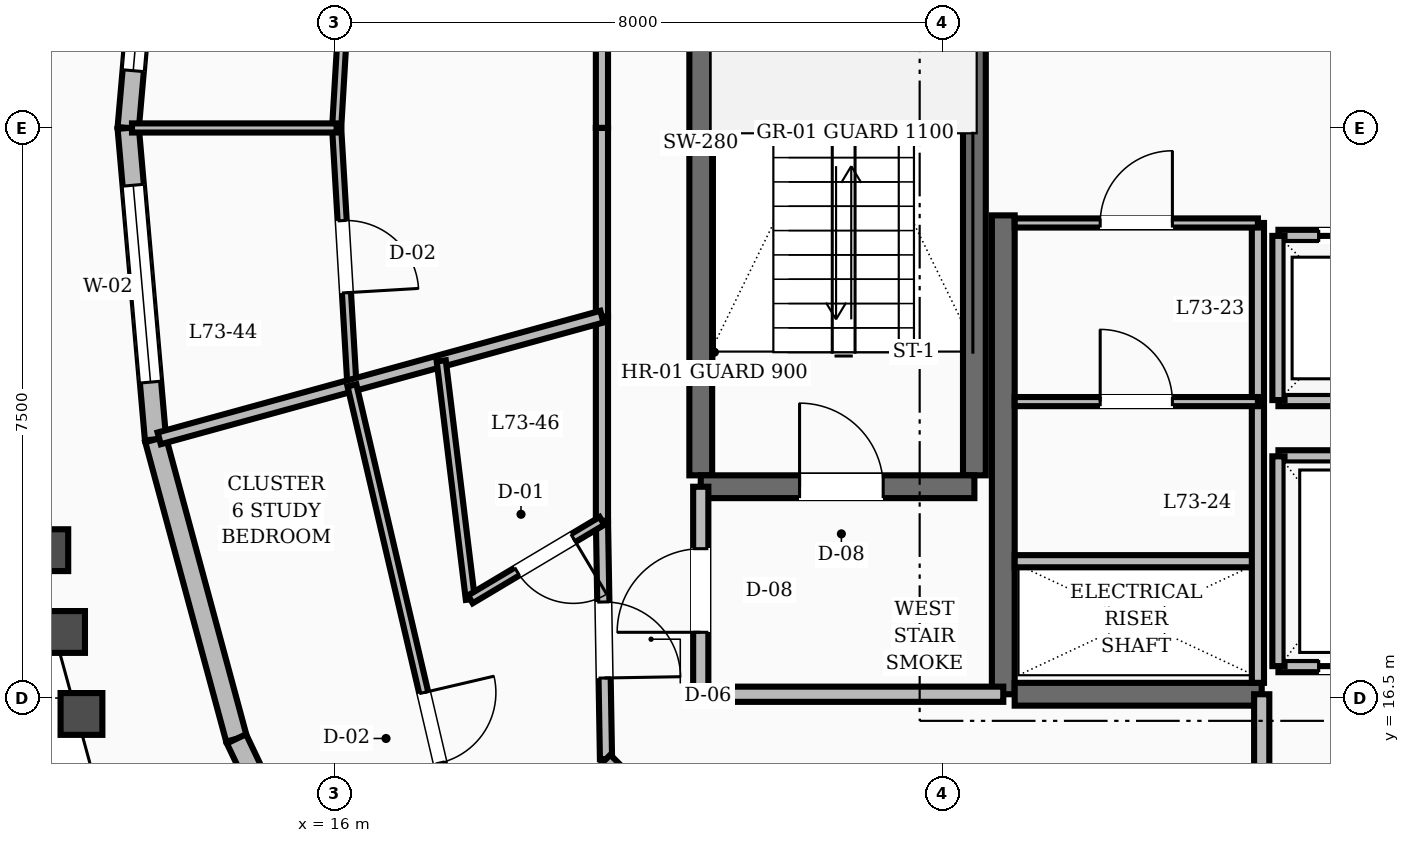
"""IFC4 building model, lengths in metres.
Left out: names, types, materials, properties, quantities, classifications, styles, units other than length and angle.
Written with IfcOpenShell. Run it as: python <this file> out.ifc"""

import sys

from ifc_helpers import new_model, si_unit, direction, frame, frame_2d, origin, place, context, subcontext, project, spatial, rectangle, extrude, element, fill, save


model = new_model("IFC4")
c1 = context("Model", 3, precision=1e-05, world=origin(), true_north=direction((0.0, 1.0)))
c2 = subcontext(c1, "Body", "Model", "MODEL_VIEW")
j1 = project(units=[si_unit("LENGTHUNIT", "METRE"), si_unit("PLANEANGLEUNIT", "RADIAN")], contexts=[c1])
p1 = place(None, origin())
s1 = spatial("IfcSite", under=j1, at=p1, CompositionType="ELEMENT")
p2 = place(p1, origin())
s2 = spatial("IfcBuilding", under=s1, at=p2, CompositionType="ELEMENT")
p3 = place(p2, frame((0.0, 0.0, 279.6)))
s3 = spatial("IfcBuildingStorey", under=s2, at=p3, CompositionType="ELEMENT", Elevation=279.6)
p4 = place(p3, frame((24.8, 16.55, 0.0), z_axis=(0.0, 0.0, 1.0), x_axis=(0.0, 1.0, 0.0)))
e1 = element("IfcWall", 1, at=p4, inside=s3, PredefinedType="SHEAR", context=c2, shape_type="SweptSolid", body=[
    extrude(rectangle(XDim=6.3, YDim=0.3, at=frame_2d((3.15, 0.0))), origin(), (0.0, 0.0, 1.0), 3.6),
])
p5 = place(p3, frame((24.95, 16.55, 0.0), z_axis=(0.0, 0.0, 1.0), x_axis=(1.0, 0.0, 0.0)))
e2 = element("IfcWall", 2, at=p5, inside=s3, PredefinedType="SHEAR", context=c2, shape_type="SweptSolid", body=[
    extrude(rectangle(XDim=3.25, YDim=0.3, at=frame_2d((1.625, 0.0))), origin(), (0.0, 0.0, 1.0), 3.6),
])
for number, where, z_axis, x_axis in (
    (3, (20.82, 19.43, 0.0), (0.0, 0.0, 1.0), (0.0, 1.0, 0.0)),
    (4, (24.42, 19.43, 0.0), (0.0, 0.0, 1.0), (0.0, 1.0, 0.0)),
):
    element("IfcWall", number, at=place(p3, frame(where, z_axis=z_axis, x_axis=x_axis)), inside=s3, PredefinedType="SHEAR", context=c2, shape_type="SweptSolid", body=[
        extrude(rectangle(XDim=8.74, YDim=0.3, at=frame_2d((4.37, 0.0))), origin(), (0.0, 0.0, 1.0), 3.6),
    ])
p6 = place(p3, frame((20.82, 19.28, 0.0), z_axis=(0.0, 0.0, 1.0), x_axis=(1.0, 0.0, 0.0)))
e5 = element("IfcWall", 5, at=p6, inside=s3, PredefinedType="SHEAR", context=c2, shape_type="SweptSolid", body=[
    extrude(rectangle(XDim=3.6, YDim=0.3, at=frame_2d((1.8, 0.0))), origin(), (0.0, 0.0, 1.0), 3.6),
])
p7 = place(p6, frame((1.3, 0.0, 0.0)))
e6 = element("IfcOpeningElement", 6, at=p7, cuts=e5, PredefinedType="OPENING", context=c2, shape_type="SweptSolid", body=[
    extrude(rectangle(XDim=1.1, YDim=2.1, at=frame_2d((0.55, 1.05))), frame((0.0, 0.16, 0.0), z_axis=(0.0, -1.0, 0.0), x_axis=(1.0, 0.0, 0.0)), (0.0, 0.0, 1.0), 0.32),
])
p8 = place(p3, frame((13.647, 28.097, 0.0), z_axis=(0.0, 0.0, 1.0), x_axis=(-0.087441623723, -0.996169645412, 0.0)))
e7 = element("IfcWall", 7, at=p8, inside=s3, PredefinedType="STANDARD", context=c2, shape_type="SweptSolid", body=[
    extrude(rectangle(XDim=4.113, YDim=0.28, at=frame_2d((2.056, 0.0))), origin(), (0.0, 0.0, 1.0), 2.88),
])
p9 = place(p8, frame((0.756, 0.0, 0.8)))
e8 = element("IfcOpeningElement", 8, at=p9, cuts=e7, PredefinedType="OPENING", context=c2, shape_type="SweptSolid", body=[
    extrude(rectangle(XDim=2.6, YDim=1.65, at=frame_2d((1.3, 0.825))), frame((0.0, 0.15, 0.0), z_axis=(0.0, -1.0, 0.0), x_axis=(1.0, 0.0, 0.0)), (0.0, 0.0, 1.0), 0.3),
])
p10 = place(p3, frame((13.287, 24.0, 0.0), z_axis=(0.0, 0.0, 1.0), x_axis=(0.087441623723, -0.996169645412, 0.0)))
e9 = element("IfcWall", 9, at=p10, inside=s3, PredefinedType="STANDARD", context=c2, shape_type="SweptSolid", body=[
    extrude(rectangle(XDim=4.113, YDim=0.28, at=frame_2d((2.056, 0.0))), origin(), (0.0, 0.0, 1.0), 2.88),
])
p11 = place(p10, frame((0.756, 0.0, 0.8)))
e10 = element("IfcOpeningElement", 10, at=p11, cuts=e9, PredefinedType="OPENING", context=c2, shape_type="SweptSolid", body=[
    extrude(rectangle(XDim=2.6, YDim=1.65, at=frame_2d((1.3, 0.825))), frame((0.0, 0.15, 0.0), z_axis=(0.0, -1.0, 0.0), x_axis=(1.0, 0.0, 0.0)), (0.0, 0.0, 1.0), 0.3),
])
p12 = place(p3, frame((13.647, 19.903, 0.0), z_axis=(0.0, 0.0, 1.0), x_axis=(0.260889436927, -0.965368686927, 0.0)))
e11 = element("IfcWall", 11, at=p12, inside=s3, PredefinedType="STANDARD", context=c2, shape_type="SweptSolid", body=[
    extrude(rectangle(XDim=4.081, YDim=0.28, at=frame_2d((2.041, 0.0))), origin(), (0.0, 0.0, 1.0), 2.88),
])
p13 = place(p3, frame((14.712, 15.963, 0.0), z_axis=(0.0, 0.0, 1.0), x_axis=(0.430011346388, -0.902823483289, 0.0)))
e12 = element("IfcWall", 12, at=p13, inside=s3, PredefinedType="STANDARD", context=c2, shape_type="SweptSolid", body=[
    extrude(rectangle(XDim=4.021, YDim=0.28, at=frame_2d((2.011, 0.0))), origin(), (0.0, 0.0, 1.0), 2.88),
])
p14 = place(p13, frame((0.711, 0.0, 0.8)))
e13 = element("IfcOpeningElement", 13, at=p14, cuts=e12, PredefinedType="OPENING", context=c2, shape_type="SweptSolid", body=[
    extrude(rectangle(XDim=2.6, YDim=1.65, at=frame_2d((1.3, 0.825))), frame((0.0, 0.15, 0.0), z_axis=(0.0, -1.0, 0.0), x_axis=(1.0, 0.0, 0.0)), (0.0, 0.0, 1.0), 0.3),
])
p15 = place(p3, frame((20.82, 16.55, 0.0), z_axis=(0.0, 0.0, 1.0), x_axis=(0.0, 1.0, 0.0)))
e14 = element("IfcWall", 14, at=p15, inside=s3, PredefinedType="SOLIDWALL", context=c2, shape_type="SweptSolid", body=[
    extrude(rectangle(XDim=2.73, YDim=0.2, at=frame_2d((1.365, 0.0))), origin(), (0.0, 0.0, 1.0), 2.87),
])
p16 = place(p15, frame((0.815, 0.0, 0.0)))
e15 = element("IfcOpeningElement", 15, at=p16, cuts=e14, PredefinedType="OPENING", context=c2, shape_type="SweptSolid", body=[
    extrude(rectangle(XDim=1.1, YDim=2.1, at=frame_2d((0.55, 1.05))), frame((0.0, 0.11, 0.0), z_axis=(0.0, -1.0, 0.0), x_axis=(1.0, 0.0, 0.0)), (0.0, 0.0, 1.0), 0.22),
])
p17 = place(p3, frame((20.82, 16.55, 0.0), z_axis=(0.0, 0.0, 1.0), x_axis=(1.0, 0.0, 0.0)))
e16 = element("IfcWall", 16, at=p17, inside=s3, PredefinedType="SOLIDWALL", context=c2, shape_type="SweptSolid", body=[
    extrude(rectangle(XDim=3.98, YDim=0.2, at=frame_2d((1.99, 0.0))), origin(), (0.0, 0.0, 1.0), 2.87),
])
p18 = place(p3, frame((28.2, 14.35, 0.0), z_axis=(0.0, 0.0, 1.0), x_axis=(0.0, 1.0, 0.0)))
e17 = element("IfcWall", 17, at=p18, inside=s3, PredefinedType="SOLIDWALL", context=c2, shape_type="SweptSolid", body=[
    extrude(rectangle(XDim=2.2, YDim=0.2, at=frame_2d((1.1, 0.0))), origin(), (0.0, 0.0, 1.0), 2.87),
])
p19 = place(p3, frame((28.42, 22.58, 0.0), z_axis=(0.0, 0.0, 1.0), x_axis=(1.0, 0.0, 0.0)))
e18 = element("IfcWall", 18, at=p19, inside=s3, PredefinedType="SOLIDWALL", context=c2, shape_type="SweptSolid", body=[
    extrude(rectangle(XDim=2.16, YDim=0.16, at=frame_2d((1.08, 0.0))), origin(), (0.0, 0.0, 1.0), 2.87),
])
p20 = place(p19, frame((0.53, 0.0, 0.0)))
e19 = element("IfcOpeningElement", 19, at=p20, cuts=e18, PredefinedType="OPENING", context=c2, shape_type="SweptSolid", body=[
    extrude(rectangle(XDim=1.1, YDim=2.15, at=frame_2d((0.55, 1.075))), frame((0.0, 0.09, 0.0), z_axis=(0.0, -1.0, 0.0), x_axis=(1.0, 0.0, 0.0)), (0.0, 0.0, 1.0), 0.18),
])
for number, where, z_axis, x_axis in (
    (20, (28.42, 20.42, 0.0), (0.0, 0.0, 1.0), (1.0, 0.0, 0.0)),
    (21, (28.42, 20.42, 0.0), (0.0, 0.0, 1.0), (0.0, 1.0, 0.0)),
):
    element("IfcWall", number, at=place(p3, frame(where, z_axis=z_axis, x_axis=x_axis)), inside=s3, PredefinedType="SOLIDWALL", context=c2, shape_type="SweptSolid", body=[
        extrude(rectangle(XDim=2.16, YDim=0.16, at=frame_2d((1.08, 0.0))), origin(), (0.0, 0.0, 1.0), 2.87),
    ])
p21 = place(p3, frame((28.42, 16.92, 0.0), z_axis=(0.0, 0.0, 1.0), x_axis=(1.0, 0.0, 0.0)))
e22 = element("IfcWall", 22, at=p21, inside=s3, PredefinedType="SOLIDWALL", context=c2, shape_type="SweptSolid", body=[
    extrude(rectangle(XDim=7.16, YDim=0.16, at=frame_2d((3.58, 0.0))), origin(), (0.0, 0.0, 1.0), 2.87),
])
p22 = place(p21, frame((0.53, 0.0, 0.0)))
e23 = element("IfcOpeningElement", 23, at=p22, cuts=e22, PredefinedType="OPENING", context=c2, shape_type="SweptSolid", body=[
    extrude(rectangle(XDim=1.1, YDim=2.15, at=frame_2d((0.55, 1.075))), frame((0.0, 0.09, 0.0), z_axis=(0.0, -1.0, 0.0), x_axis=(1.0, 0.0, 0.0)), (0.0, 0.0, 1.0), 0.18),
])
p23 = place(p21, frame((3.03, 0.0, 0.0)))
e24 = element("IfcOpeningElement", 24, at=p23, cuts=e22, PredefinedType="OPENING", context=c2, shape_type="SweptSolid", body=[
    extrude(rectangle(XDim=1.1, YDim=2.15, at=frame_2d((0.55, 1.075))), frame((0.0, 0.09, 0.0), z_axis=(0.0, -1.0, 0.0), x_axis=(1.0, 0.0, 0.0)), (0.0, 0.0, 1.0), 0.18),
])
p24 = place(p21, frame((5.53, 0.0, 0.0)))
e25 = element("IfcOpeningElement", 25, at=p24, cuts=e22, PredefinedType="OPENING", context=c2, shape_type="SweptSolid", body=[
    extrude(rectangle(XDim=1.1, YDim=2.15, at=frame_2d((0.55, 1.075))), frame((0.0, 0.09, 0.0), z_axis=(0.0, -1.0, 0.0), x_axis=(1.0, 0.0, 0.0)), (0.0, 0.0, 1.0), 0.18),
])
p25 = place(p3, frame((28.42, 19.68, 0.0), z_axis=(0.0, 0.0, 1.0), x_axis=(1.0, 0.0, 0.0)))
e26 = element("IfcWall", 26, at=p25, inside=s3, PredefinedType="SOLIDWALL", context=c2, shape_type="SweptSolid", body=[
    extrude(rectangle(XDim=7.16, YDim=0.16, at=frame_2d((3.58, 0.0))), origin(), (0.0, 0.0, 1.0), 2.87),
])
p26 = place(p3, frame((28.42, 16.92, 0.0), z_axis=(0.0, 0.0, 1.0), x_axis=(0.0, 1.0, 0.0)))
e27 = element("IfcWall", 27, at=p26, inside=s3, PredefinedType="SOLIDWALL", context=c2, shape_type="SweptSolid", body=[
    extrude(rectangle(XDim=2.76, YDim=0.16, at=frame_2d((1.38, 0.0))), origin(), (0.0, 0.0, 1.0), 2.87),
])
p27 = place(p3, frame((24.95, 18.3, 0.0), z_axis=(0.0, 0.0, 1.0), x_axis=(1.0, 0.0, 0.0)))
e28 = element("IfcWall", 28, at=p27, inside=s3, PredefinedType="SOLIDWALL", context=c2, shape_type="SweptSolid", body=[
    extrude(rectangle(XDim=3.2, YDim=0.16, at=frame_2d((1.6, 0.0))), origin(), (0.0, 0.0, 1.0), 2.87),
])
p28 = place(p3, frame((28.15, 16.7, 0.0), z_axis=(0.0, 0.0, 1.0), x_axis=(0.0, 1.0, 0.0)))
e29 = element("IfcWall", 29, at=p28, inside=s3, PredefinedType="SOLIDWALL", context=c2, shape_type="SweptSolid", body=[
    extrude(rectangle(XDim=6.05, YDim=0.16, at=frame_2d((3.025, 0.0))), origin(), (0.0, 0.0, 1.0), 2.87),
])
p29 = place(p3, frame((24.95, 22.75, 0.0), z_axis=(0.0, 0.0, 1.0), x_axis=(1.0, 0.0, 0.0)))
e30 = element("IfcWall", 30, at=p29, inside=s3, PredefinedType="PARTITIONING", context=c2, shape_type="SweptSolid", body=[
    extrude(rectangle(XDim=3.2, YDim=0.12, at=frame_2d((1.6, 0.0))), origin(), (0.0, 0.0, 1.0), 2.87),
])
p30 = place(p29, frame((1.125, 0.0, 0.0)))
e31 = element("IfcOpeningElement", 31, at=p30, cuts=e30, PredefinedType="OPENING", context=c2, shape_type="SweptSolid", body=[
    extrude(rectangle(XDim=0.95, YDim=2.1, at=frame_2d((0.475, 1.05))), frame((0.0, 0.07, 0.0), z_axis=(0.0, -1.0, 0.0), x_axis=(1.0, 0.0, 0.0)), (0.0, 0.0, 1.0), 0.14),
])
p31 = place(p3, frame((24.95, 20.4, 0.0), z_axis=(0.0, 0.0, 1.0), x_axis=(1.0, 0.0, 0.0)))
e32 = element("IfcWall", 32, at=p31, inside=s3, PredefinedType="PARTITIONING", context=c2, shape_type="SweptSolid", body=[
    extrude(rectangle(XDim=3.2, YDim=0.12, at=frame_2d((1.6, 0.0))), origin(), (0.0, 0.0, 1.0), 2.87),
])
p32 = place(p31, frame((1.125, 0.0, 0.0)))
e33 = element("IfcOpeningElement", 33, at=p32, cuts=e32, PredefinedType="OPENING", context=c2, shape_type="SweptSolid", body=[
    extrude(rectangle(XDim=0.95, YDim=2.1, at=frame_2d((0.475, 1.05))), frame((0.0, 0.07, 0.0), z_axis=(0.0, -1.0, 0.0), x_axis=(1.0, 0.0, 0.0)), (0.0, 0.0, 1.0), 0.14),
])
for number, where, z_axis, x_axis in (
    (34, (19.52, 26.482, 0.0), (0.0, 0.0, 1.0), (0.0, -1.0, 0.0)),
    (35, (19.52, 24.0, 0.0), (0.0, 0.0, 1.0), (0.0, -1.0, 0.0)),
):
    element("IfcWall", number, at=place(p3, frame(where, z_axis=z_axis, x_axis=x_axis)), inside=s3, PredefinedType="SOLIDWALL", context=c2, shape_type="SweptSolid", body=[
        extrude(rectangle(XDim=2.482, YDim=0.16, at=frame_2d((1.241, 0.0))), origin(), (0.0, 0.0, 1.0), 2.87),
    ])
p33 = place(p3, frame((19.52, 21.518, 0.0), z_axis=(0.0, 0.0, 1.0), x_axis=(0.0, -1.0, 0.0)))
e36 = element("IfcWall", 36, at=p33, inside=s3, PredefinedType="SOLIDWALL", context=c2, shape_type="SweptSolid", body=[
    extrude(rectangle(XDim=2.687, YDim=0.16, at=frame_2d((1.344, 0.0))), origin(), (0.0, 0.0, 1.0), 2.87),
])
p34 = place(p3, frame((19.52, 18.831, 0.0), z_axis=(0.0, 0.0, 1.0), x_axis=(0.016981035134, -0.999855811828, 0.0)))
e37 = element("IfcWall", 37, at=p34, inside=s3, PredefinedType="SOLIDWALL", context=c2, shape_type="SweptSolid", body=[
    extrude(rectangle(XDim=3.134, YDim=0.16, at=frame_2d((1.567, 0.0))), origin(), (0.0, 0.0, 1.0), 2.87),
])
p35 = place(p34, frame((1.067, 0.0, 0.0)))
e38 = element("IfcOpeningElement", 38, at=p35, cuts=e37, PredefinedType="OPENING", context=c2, shape_type="SweptSolid", body=[
    extrude(rectangle(XDim=1.0, YDim=2.1, at=frame_2d((0.5, 1.05))), frame((0.0, 0.09, 0.0), z_axis=(0.0, -1.0, 0.0), x_axis=(1.0, 0.0, 0.0)), (0.0, 0.0, 1.0), 0.18),
])
p36 = place(p3, frame((19.573, 15.697, 0.0), z_axis=(0.0, 0.0, 1.0), x_axis=(0.707106781187, -0.707106781187, 0.0)))
e39 = element("IfcWall", 39, at=p36, inside=s3, PredefinedType="SOLIDWALL", context=c2, shape_type="SweptSolid", body=[
    extrude(rectangle(XDim=2.916, YDim=0.16, at=frame_2d((1.458, 0.0))), origin(), (0.0, 0.0, 1.0), 2.87),
])
p37 = place(p3, frame((16.231, 27.387, 0.0), z_axis=(0.0, 0.0, 1.0), x_axis=(-0.059367421014, -0.998236199164, 0.0)))
e40 = element("IfcWall", 40, at=p37, inside=s3, PredefinedType="PARTITIONING", context=c2, shape_type="SweptSolid", body=[
    extrude(rectangle(XDim=3.393, YDim=0.12, at=frame_2d((1.696, 0.0))), origin(), (0.0, 0.0, 1.0), 2.87),
])
p38 = place(p37, frame((1.221, 0.0, 0.0)))
e41 = element("IfcOpeningElement", 41, at=p38, cuts=e40, PredefinedType="OPENING", context=c2, shape_type="SweptSolid", body=[
    extrude(rectangle(XDim=0.95, YDim=2.1, at=frame_2d((0.475, 1.05))), frame((0.0, 0.07, 0.0), z_axis=(0.0, -1.0, 0.0), x_axis=(1.0, 0.0, 0.0)), (0.0, 0.0, 1.0), 0.14),
])
p39 = place(p3, frame((16.03, 24.0, 0.0), z_axis=(0.0, 0.0, 1.0), x_axis=(0.059367421014, -0.998236199164, 0.0)))
e42 = element("IfcWall", 42, at=p39, inside=s3, PredefinedType="PARTITIONING", context=c2, shape_type="SweptSolid", body=[
    extrude(rectangle(XDim=3.393, YDim=0.12, at=frame_2d((1.696, 0.0))), origin(), (0.0, 0.0, 1.0), 2.87),
])
p40 = place(p39, frame((1.221, 0.0, 0.0)))
e43 = element("IfcOpeningElement", 43, at=p40, cuts=e42, PredefinedType="OPENING", context=c2, shape_type="SweptSolid", body=[
    extrude(rectangle(XDim=0.95, YDim=2.1, at=frame_2d((0.475, 1.05))), frame((0.0, 0.07, 0.0), z_axis=(0.0, -1.0, 0.0), x_axis=(1.0, 0.0, 0.0)), (0.0, 0.0, 1.0), 0.14),
])
p41 = place(p3, frame((16.03, 24.0, 0.0), z_axis=(0.0, 0.0, 1.0), x_axis=(-1.0, 0.0, 0.0)))
e44 = element("IfcWall", 44, at=p41, inside=s3, PredefinedType="PARTITIONING", context=c2, shape_type="SweptSolid", body=[
    extrude(rectangle(XDim=2.692, YDim=0.12, at=frame_2d((1.346, 0.0))), origin(), (0.0, 0.0, 1.0), 2.87),
])
p42 = place(p3, frame((19.52, 21.518, 0.0), z_axis=(0.0, 0.0, 1.0), x_axis=(-0.964228378678, -0.265072883849, 0.0)))
e45 = element("IfcWall", 45, at=p42, inside=s3, PredefinedType="SOLIDWALL", context=c2, shape_type="SweptSolid", body=[
    extrude(rectangle(XDim=6.041, YDim=0.16, at=frame_2d((3.021, 0.0))), origin(), (0.0, 0.0, 1.0), 2.87),
])
p43 = place(p3, frame((17.406, 20.936, 0.0), z_axis=(0.0, 0.0, 1.0), x_axis=(0.121249255799, -0.992622092222, 0.0)))
e46 = element("IfcWall", 46, at=p43, inside=s3, PredefinedType="PARTITIONING", context=c2, shape_type="SweptSolid", body=[
    extrude(rectangle(XDim=3.161, YDim=0.12, at=frame_2d((1.581, 0.0))), origin(), (0.0, 0.0, 1.0), 2.87),
])
p44 = place(p3, frame((19.52, 18.831, 0.0), z_axis=(0.0, 0.0, 1.0), x_axis=(-0.858879340115, -0.512177976023, 0.0)))
e47 = element("IfcWall", 47, at=p44, inside=s3, PredefinedType="PARTITIONING", context=c2, shape_type="SweptSolid", body=[
    extrude(rectangle(XDim=2.015, YDim=0.12, at=frame_2d((1.008, 0.0))), origin(), (0.0, 0.0, 1.0), 2.87),
])
p45 = place(p44, frame((0.44, 0.0, 0.0)))
e48 = element("IfcOpeningElement", 48, at=p45, cuts=e47, PredefinedType="OPENING", context=c2, shape_type="SweptSolid", body=[
    extrude(rectangle(XDim=0.86, YDim=2.1, at=frame_2d((0.43, 1.05))), frame((0.0, 0.07, 0.0), z_axis=(0.0, -1.0, 0.0), x_axis=(1.0, 0.0, 0.0)), (0.0, 0.0, 1.0), 0.14),
])
p46 = place(p3, frame((16.231, 20.613, 0.0), z_axis=(0.0, 0.0, 1.0), x_axis=(0.22738655048, -0.973804578271, 0.0)))
e49 = element("IfcWall", 49, at=p46, inside=s3, PredefinedType="PARTITIONING", context=c2, shape_type="SweptSolid", body=[
    extrude(rectangle(XDim=6.983, YDim=0.12, at=frame_2d((3.492, 0.0))), origin(), (0.0, 0.0, 1.0), 2.87),
])
p47 = place(p46, frame((4.15, 0.0, 0.0)))
e50 = element("IfcOpeningElement", 50, at=p47, cuts=e49, PredefinedType="OPENING", context=c2, shape_type="SweptSolid", body=[
    extrude(rectangle(XDim=0.95, YDim=2.1, at=frame_2d((0.475, 1.05))), frame((0.0, 0.07, 0.0), z_axis=(0.0, -1.0, 0.0), x_axis=(1.0, 0.0, 0.0)), (0.0, 0.0, 1.0), 0.14),
])
p48 = place(p9, origin())
e51 = element("IfcWindow", 51, at=p48, inside=s3, PartitioningType="SINGLE_PANEL", PredefinedType="WINDOW", context=c2, shape_type="SweptSolid", body=[
    extrude(rectangle(XDim=2.6, YDim=1.65, at=frame_2d((1.3, 0.825))), frame((0.0, 0.03, 0.0), z_axis=(0.0, -1.0, 0.0), x_axis=(1.0, 0.0, 0.0)), (0.0, 0.0, 1.0), 0.06),
])
fill(e8, e51)
p49 = place(p11, origin())
e52 = element("IfcWindow", 52, at=p49, inside=s3, PartitioningType="SINGLE_PANEL", PredefinedType="WINDOW", context=c2, shape_type="SweptSolid", body=[
    extrude(rectangle(XDim=2.6, YDim=1.65, at=frame_2d((1.3, 0.825))), frame((0.0, 0.03, 0.0), z_axis=(0.0, -1.0, 0.0), x_axis=(1.0, 0.0, 0.0)), (0.0, 0.0, 1.0), 0.06),
])
fill(e10, e52)
p50 = place(p7, origin())
e53 = element("IfcDoor", 53, at=p50, inside=s3, OperationType="SINGLE_SWING_LEFT", PredefinedType="DOOR", context=c2, shape_type="SweptSolid", body=[
    extrude(rectangle(XDim=1.1, YDim=2.1, at=frame_2d((0.55, 1.05))), frame((0.0, 0.025, 0.0), z_axis=(0.0, -1.0, 0.0), x_axis=(1.0, 0.0, 0.0)), (0.0, 0.0, 1.0), 0.05),
])
fill(e6, e53)
p51 = place(p16, origin())
e54 = element("IfcDoor", 54, at=p51, inside=s3, OperationType="SINGLE_SWING_LEFT", PredefinedType="DOOR", context=c2, shape_type="SweptSolid", body=[
    extrude(rectangle(XDim=1.1, YDim=2.1, at=frame_2d((0.55, 1.05))), frame((0.0, 0.025, 0.0), z_axis=(0.0, -1.0, 0.0), x_axis=(1.0, 0.0, 0.0)), (0.0, 0.0, 1.0), 0.05),
])
fill(e15, e54)
p52 = place(p20, origin())
e55 = element("IfcDoor", 55, at=p52, inside=s3, OperationType="SLIDING_TO_LEFT", PredefinedType="DOOR", context=c2, shape_type="SweptSolid", body=[
    extrude(rectangle(XDim=1.1, YDim=2.15, at=frame_2d((0.55, 1.075))), frame((0.0, 0.025, 0.0), z_axis=(0.0, -1.0, 0.0), x_axis=(1.0, 0.0, 0.0)), (0.0, 0.0, 1.0), 0.05),
])
fill(e19, e55)
p53 = place(p22, origin())
e56 = element("IfcDoor", 56, at=p53, inside=s3, OperationType="SLIDING_TO_RIGHT", PredefinedType="DOOR", context=c2, shape_type="SweptSolid", body=[
    extrude(rectangle(XDim=1.1, YDim=2.15, at=frame_2d((0.55, 1.075))), frame((0.0, 0.025, 0.0), z_axis=(0.0, -1.0, 0.0), x_axis=(1.0, 0.0, 0.0)), (0.0, 0.0, 1.0), 0.05),
])
fill(e23, e56)
p54 = place(p30, origin())
e57 = element("IfcDoor", 57, at=p54, inside=s3, OperationType="SINGLE_SWING_RIGHT", PredefinedType="DOOR", context=c2, shape_type="SweptSolid", body=[
    extrude(rectangle(XDim=0.95, YDim=2.1, at=frame_2d((0.475, 1.05))), frame((0.0, 0.025, 0.0), z_axis=(0.0, -1.0, 0.0), x_axis=(1.0, 0.0, 0.0)), (0.0, 0.0, 1.0), 0.05),
])
fill(e31, e57)
p55 = place(p32, origin())
e58 = element("IfcDoor", 58, at=p55, inside=s3, OperationType="SINGLE_SWING_LEFT", PredefinedType="DOOR", context=c2, shape_type="SweptSolid", body=[
    extrude(rectangle(XDim=0.95, YDim=2.1, at=frame_2d((0.475, 1.05))), frame((0.0, 0.025, 0.0), z_axis=(0.0, -1.0, 0.0), x_axis=(1.0, 0.0, 0.0)), (0.0, 0.0, 1.0), 0.05),
])
fill(e33, e58)
p56 = place(p40, origin())
e59 = element("IfcDoor", 59, at=p56, inside=s3, OperationType="SINGLE_SWING_RIGHT", PredefinedType="DOOR", context=c2, shape_type="SweptSolid", body=[
    extrude(rectangle(XDim=0.95, YDim=2.1, at=frame_2d((0.475, 1.05))), frame((0.0, 0.025, 0.0), z_axis=(0.0, -1.0, 0.0), x_axis=(1.0, 0.0, 0.0)), (0.0, 0.0, 1.0), 0.05),
])
fill(e43, e59)
p57 = place(p45, origin())
e60 = element("IfcDoor", 60, at=p57, inside=s3, OperationType="SINGLE_SWING_LEFT", PredefinedType="DOOR", context=c2, shape_type="SweptSolid", body=[
    extrude(rectangle(XDim=0.86, YDim=2.1, at=frame_2d((0.43, 1.05))), frame((0.0, 0.025, 0.0), z_axis=(0.0, -1.0, 0.0), x_axis=(1.0, 0.0, 0.0)), (0.0, 0.0, 1.0), 0.05),
])
fill(e48, e60)
p58 = place(p35, origin())
e61 = element("IfcDoor", 61, at=p58, inside=s3, OperationType="SINGLE_SWING_RIGHT", PredefinedType="DOOR", context=c2, shape_type="SweptSolid", body=[
    extrude(rectangle(XDim=1.0, YDim=2.1, at=frame_2d((0.5, 1.05))), frame((0.0, 0.025, 0.0), z_axis=(0.0, -1.0, 0.0), x_axis=(1.0, 0.0, 0.0)), (0.0, 0.0, 1.0), 0.05),
])
fill(e38, e61)
p59 = place(p47, origin())
e62 = element("IfcDoor", 62, at=p59, inside=s3, OperationType="SINGLE_SWING_LEFT", PredefinedType="DOOR", context=c2, shape_type="SweptSolid", body=[
    extrude(rectangle(XDim=0.95, YDim=2.1, at=frame_2d((0.475, 1.05))), frame((0.0, 0.025, 0.0), z_axis=(0.0, -1.0, 0.0), x_axis=(1.0, 0.0, 0.0)), (0.0, 0.0, 1.0), 0.05),
])
fill(e50, e62)
save(model, sys.argv[1])
